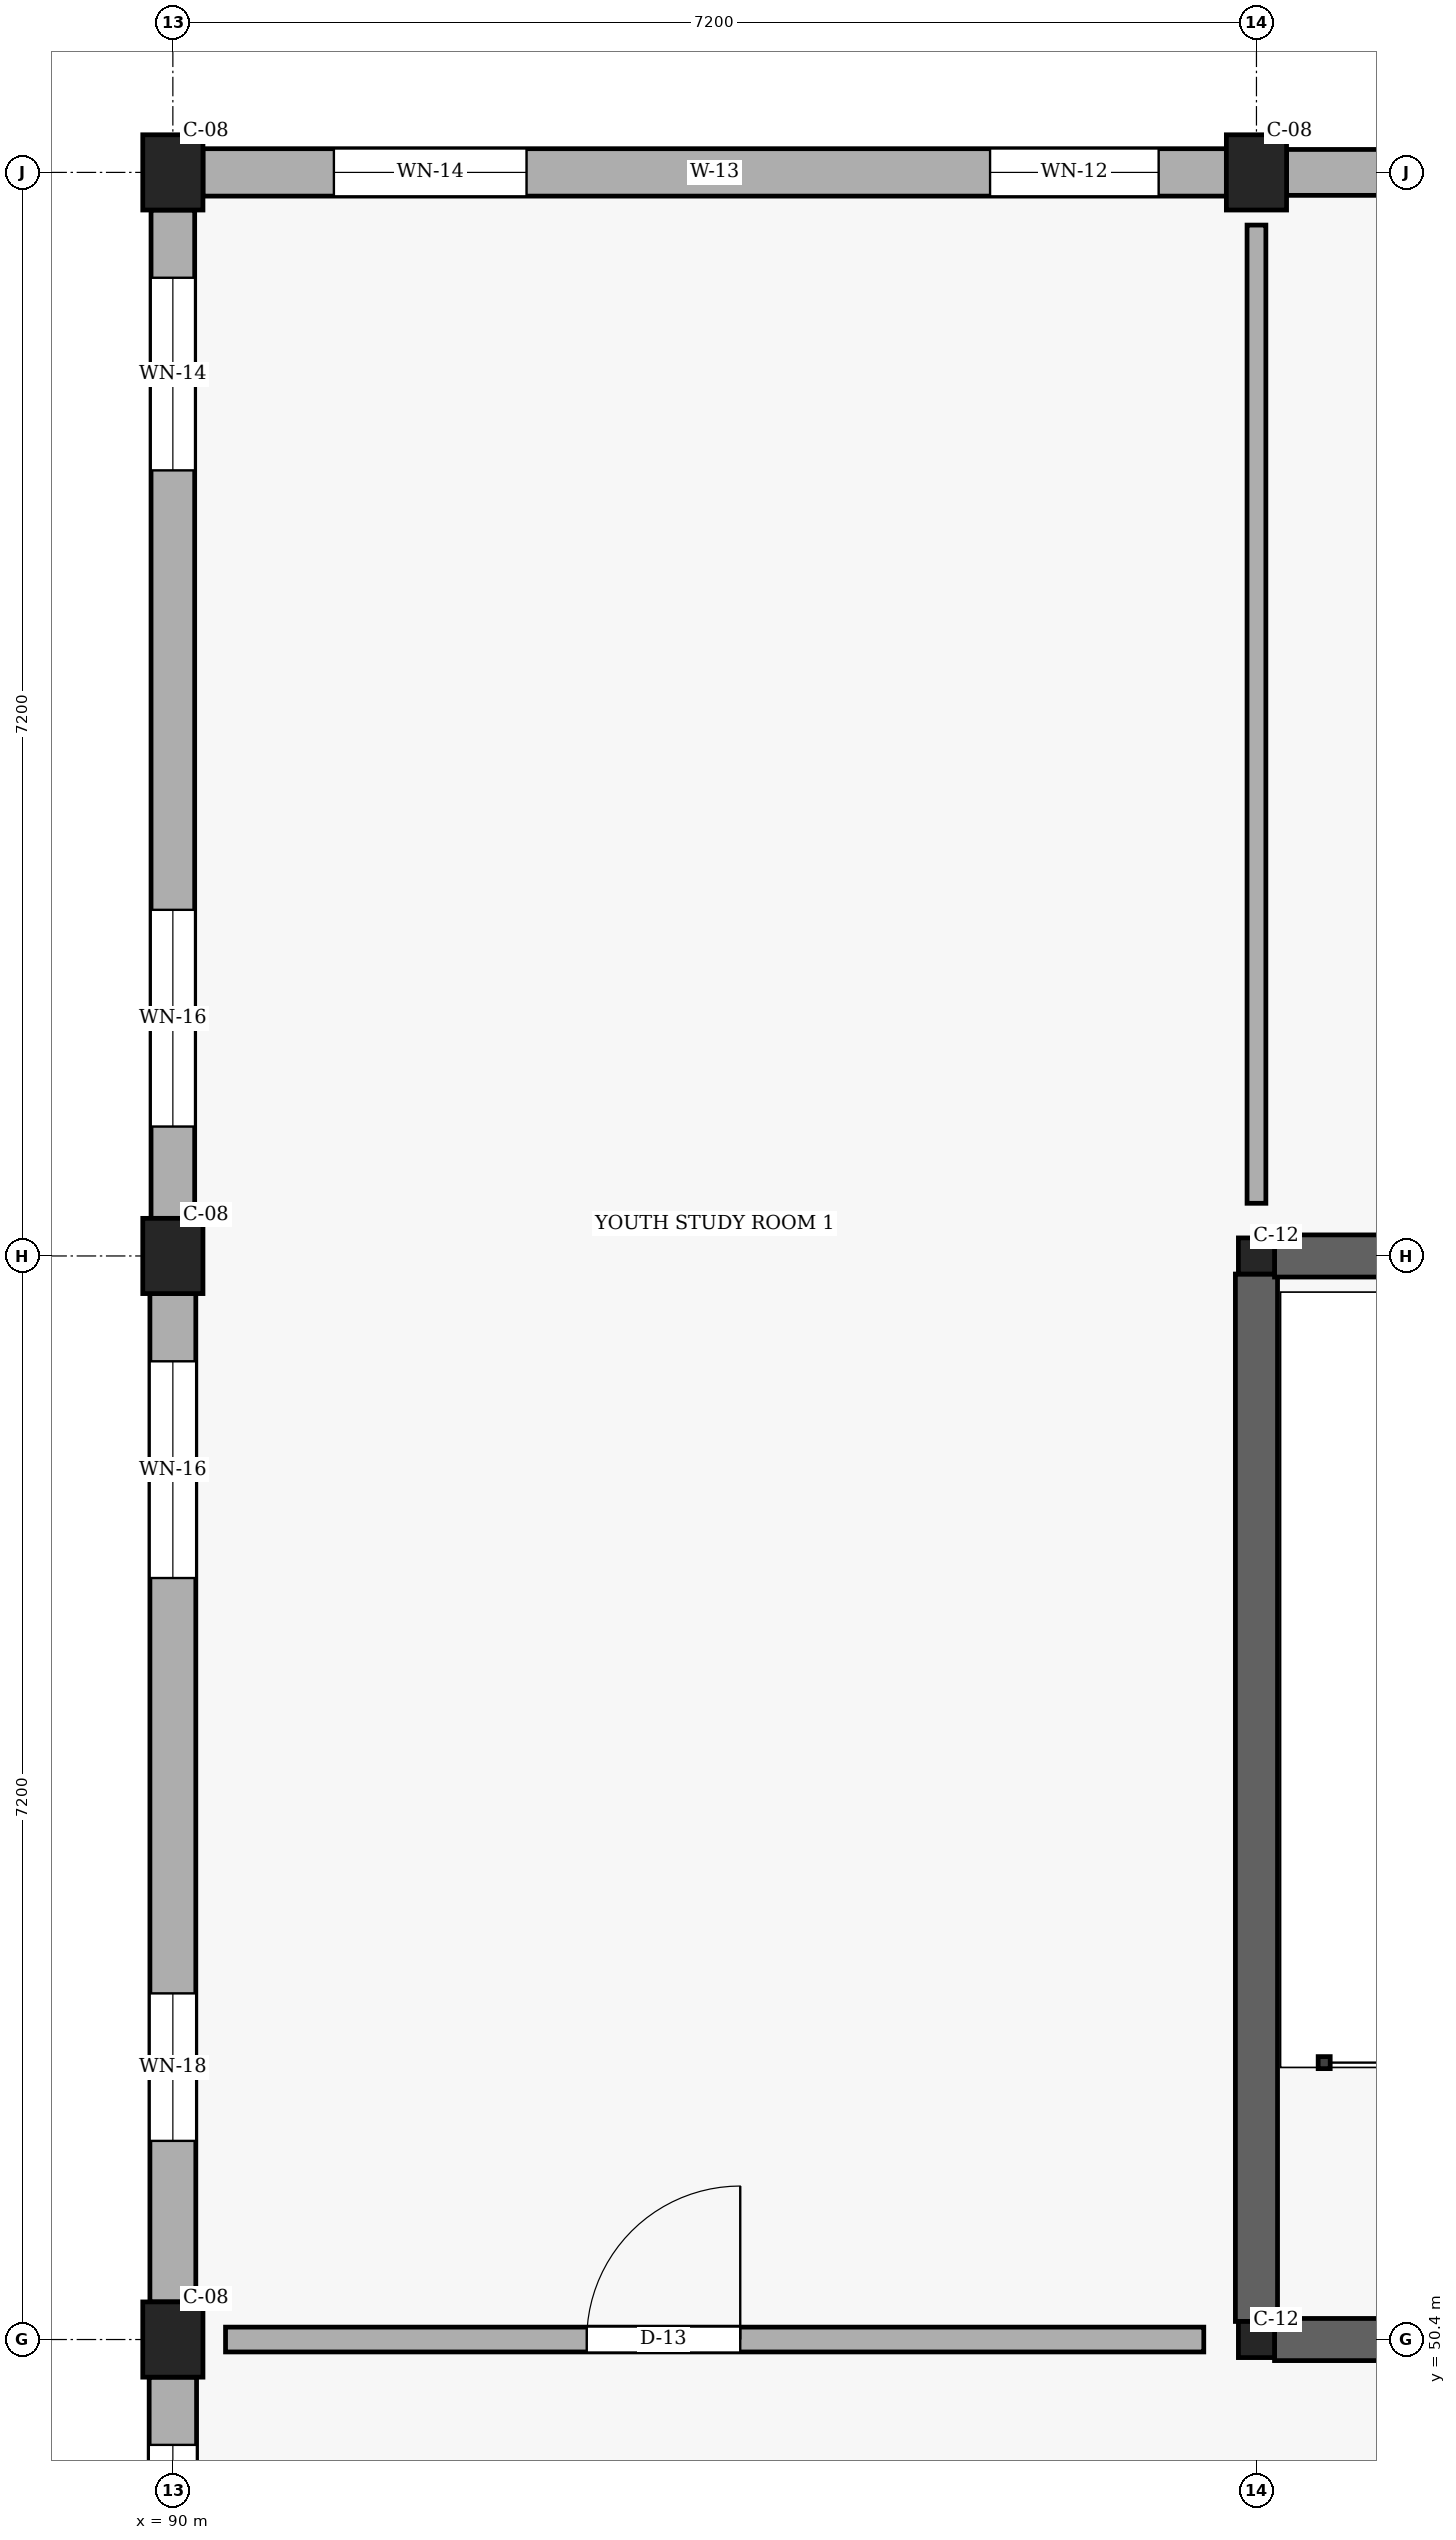
"""IFC4 building model, lengths in metres.
Left out: names, types, materials, properties, quantities, classifications, styles, units other than length and angle.
Written with IfcOpenShell. Run it as: python <this file> out.ifc"""

import sys

from ifc_helpers import new_model, si_unit, direction, frame, frame_2d, origin, origin_2d, place, context, subcontext, project, spatial, rectangle, i_section, extrude, element, fill, save


model = new_model("IFC4")
c1 = context("Model", 3, precision=1e-05, world=origin(), true_north=direction((0.0, 1.0)))
c2 = subcontext(c1, "Body", "Model", "MODEL_VIEW")
j1 = project(units=[si_unit("LENGTHUNIT", "METRE"), si_unit("PLANEANGLEUNIT", "RADIAN")], contexts=[c1])
p1 = place(None, origin())
s1 = spatial("IfcSite", under=j1, at=p1, CompositionType="ELEMENT")
p2 = place(p1, origin())
s2 = spatial("IfcBuilding", under=s1, at=p2, CompositionType="ELEMENT")
p3 = place(p2, frame((0.0, 0.0, 4.5)))
s3 = spatial("IfcBuildingStorey", under=s2, at=p3, CompositionType="ELEMENT", Elevation=4.5)
for number, where, z_axis, x_axis in (
    (1, (90.0, 50.4, 0.0), (0.0, 0.0, 1.0), (1.0, 0.0, 0.0)),
    (2, (90.0, 57.6, 0.0), (0.0, 0.0, 1.0), (1.0, 0.0, 0.0)),
    (3, (90.0, 64.8, 0.0), (0.0, 0.0, 1.0), (1.0, 0.0, 0.0)),
):
    element("IfcColumn", number, at=place(p3, frame(where, z_axis=z_axis, x_axis=x_axis)), inside=s3, PredefinedType="COLUMN", context=c2, shape_type="SweptSolid", body=[
        extrude(rectangle(XDim=0.4, YDim=0.5, at=origin_2d()), origin(), (0.0, 0.0, 1.0), 3.15),
    ])
for number, where, z_axis, x_axis in (
    (4, (97.2, 50.4, 0.0), (0.0, 0.0, 1.0), (1.0, 0.0, 0.0)),
    (5, (97.2, 57.6, 0.0), (0.0, 0.0, 1.0), (1.0, 0.0, 0.0)),
):
    element("IfcColumn", number, at=place(p3, frame(where, z_axis=z_axis, x_axis=x_axis)), inside=s3, PredefinedType="COLUMN", context=c2, shape_type="SweptSolid", body=[
        extrude(i_section(OverallWidth=0.24, OverallDepth=0.24, WebThickness=0.01, FlangeThickness=0.017, FilletRadius=0.021, at=origin_2d()), origin(), (0.0, 0.0, 1.0), 3.15),
    ])
p4 = place(p3, frame((97.2, 64.8, 0.0), z_axis=(0.0, 0.0, 1.0), x_axis=(1.0, 0.0, 0.0)))
e6 = element("IfcColumn", 6, at=p4, inside=s3, PredefinedType="COLUMN", context=c2, shape_type="SweptSolid", body=[
    extrude(rectangle(XDim=0.4, YDim=0.5, at=origin_2d()), origin(), (0.0, 0.0, 1.0), 3.15),
])
p5 = place(p3, frame((104.2, 64.8, 0.0), z_axis=(0.0, 0.0, 1.0), x_axis=(-1.0, 0.0, 0.0)))
e7 = element("IfcWall", 7, at=p5, inside=s3, PredefinedType="SOLIDWALL", context=c2, shape_type="SweptSolid", body=[
    extrude(rectangle(XDim=6.8, YDim=0.305, at=frame_2d((3.4, 0.0))), origin(), (0.0, 0.0, 1.0), 2.34),
])
p6 = place(p5, frame((0.45, 0.0, 0.78)))
e8 = element("IfcOpeningElement", 8, at=p6, cuts=e7, PredefinedType="OPENING", context=c2, shape_type="SweptSolid", body=[
    extrude(rectangle(XDim=0.96, YDim=1.26, at=frame_2d((0.48, 0.63))), frame((0.0, 0.163, 0.0), z_axis=(0.0, -1.0, 0.0), x_axis=(1.0, 0.0, 0.0)), (0.0, 0.0, 1.0), 0.325),
])
p7 = place(p5, frame((4.65, 0.0, 0.78)))
e9 = element("IfcOpeningElement", 9, at=p7, cuts=e7, PredefinedType="OPENING", context=c2, shape_type="SweptSolid", body=[
    extrude(rectangle(XDim=1.12, YDim=1.26, at=frame_2d((0.56, 0.63))), frame((0.0, 0.163, 0.0), z_axis=(0.0, -1.0, 0.0), x_axis=(1.0, 0.0, 0.0)), (0.0, 0.0, 1.0), 0.325),
])
p8 = place(p3, frame((97.0, 64.8, 0.0), z_axis=(0.0, 0.0, 1.0), x_axis=(-1.0, 0.0, 0.0)))
e10 = element("IfcWall", 10, at=p8, inside=s3, PredefinedType="SOLIDWALL", context=c2, shape_type="SweptSolid", body=[
    extrude(rectangle(XDim=6.8, YDim=0.315, at=frame_2d((3.4, 0.0))), origin(), (0.0, 0.0, 1.0), 2.34),
])
p9 = place(p8, frame((0.45, 0.0, 0.78)))
e11 = element("IfcOpeningElement", 11, at=p9, cuts=e10, PredefinedType="OPENING", context=c2, shape_type="SweptSolid", body=[
    extrude(rectangle(XDim=1.12, YDim=1.26, at=frame_2d((0.56, 0.63))), frame((0.0, 0.167, 0.0), z_axis=(0.0, -1.0, 0.0), x_axis=(1.0, 0.0, 0.0)), (0.0, 0.0, 1.0), 0.335),
])
p10 = place(p8, frame((4.65, 0.0, 0.78)))
e12 = element("IfcOpeningElement", 12, at=p10, cuts=e10, PredefinedType="OPENING", context=c2, shape_type="SweptSolid", body=[
    extrude(rectangle(XDim=1.28, YDim=1.26, at=frame_2d((0.64, 0.63))), frame((0.0, 0.167, 0.0), z_axis=(0.0, -1.0, 0.0), x_axis=(1.0, 0.0, 0.0)), (0.0, 0.0, 1.0), 0.335),
])
p11 = place(p3, frame((90.0, 64.55, 0.0), z_axis=(0.0, 0.0, 1.0), x_axis=(0.0, -1.0, 0.0)))
e13 = element("IfcWall", 13, at=p11, inside=s3, PredefinedType="SOLIDWALL", context=c2, shape_type="SweptSolid", body=[
    extrude(rectangle(XDim=6.7, YDim=0.29, at=frame_2d((3.35, 0.0))), origin(), (0.0, 0.0, 1.0), 2.34),
])
p12 = place(p11, frame((0.45, 0.0, 0.78)))
e14 = element("IfcOpeningElement", 14, at=p12, cuts=e13, PredefinedType="OPENING", context=c2, shape_type="SweptSolid", body=[
    extrude(rectangle(XDim=1.28, YDim=1.26, at=frame_2d((0.64, 0.63))), frame((0.0, 0.155, 0.0), z_axis=(0.0, -1.0, 0.0), x_axis=(1.0, 0.0, 0.0)), (0.0, 0.0, 1.0), 0.31),
])
p13 = place(p11, frame((4.65, 0.0, 0.78)))
e15 = element("IfcOpeningElement", 15, at=p13, cuts=e13, PredefinedType="OPENING", context=c2, shape_type="SweptSolid", body=[
    extrude(rectangle(XDim=1.44, YDim=1.26, at=frame_2d((0.72, 0.63))), frame((0.0, 0.155, 0.0), z_axis=(0.0, -1.0, 0.0), x_axis=(1.0, 0.0, 0.0)), (0.0, 0.0, 1.0), 0.31),
])
p14 = place(p3, frame((90.0, 57.35, 0.0), z_axis=(0.0, 0.0, 1.0), x_axis=(0.0, -1.0, 0.0)))
e16 = element("IfcWall", 16, at=p14, inside=s3, PredefinedType="SOLIDWALL", context=c2, shape_type="SweptSolid", body=[
    extrude(rectangle(XDim=6.7, YDim=0.305, at=frame_2d((3.35, 0.0))), origin(), (0.0, 0.0, 1.0), 2.34),
])
p15 = place(p14, frame((0.45, 0.0, 0.78)))
e17 = element("IfcOpeningElement", 17, at=p15, cuts=e16, PredefinedType="OPENING", context=c2, shape_type="SweptSolid", body=[
    extrude(rectangle(XDim=1.44, YDim=1.26, at=frame_2d((0.72, 0.63))), frame((0.0, 0.163, 0.0), z_axis=(0.0, -1.0, 0.0), x_axis=(1.0, 0.0, 0.0)), (0.0, 0.0, 1.0), 0.325),
])
p16 = place(p14, frame((4.65, 0.0, 0.78)))
e18 = element("IfcOpeningElement", 18, at=p16, cuts=e16, PredefinedType="OPENING", context=c2, shape_type="SweptSolid", body=[
    extrude(rectangle(XDim=0.98, YDim=1.36, at=frame_2d((0.49, 0.68))), frame((0.0, 0.163, 0.0), z_axis=(0.0, -1.0, 0.0), x_axis=(1.0, 0.0, 0.0)), (0.0, 0.0, 1.0), 0.325),
])
p17 = place(p3, frame((90.0, 50.15, 0.0), z_axis=(0.0, 0.0, 1.0), x_axis=(0.0, -1.0, 0.0)))
e19 = element("IfcWall", 19, at=p17, inside=s3, PredefinedType="SOLIDWALL", context=c2, shape_type="SweptSolid", body=[
    extrude(rectangle(XDim=6.7, YDim=0.315, at=frame_2d((3.35, 0.0))), origin(), (0.0, 0.0, 1.0), 2.34),
])
p18 = place(p17, frame((0.45, 0.0, 0.78)))
e20 = element("IfcOpeningElement", 20, at=p18, cuts=e19, PredefinedType="OPENING", context=c2, shape_type="SweptSolid", body=[
    extrude(rectangle(XDim=0.98, YDim=1.36, at=frame_2d((0.49, 0.68))), frame((0.0, 0.167, 0.0), z_axis=(0.0, -1.0, 0.0), x_axis=(1.0, 0.0, 0.0)), (0.0, 0.0, 1.0), 0.335),
])
p19 = place(p17, frame((4.65, 0.0, 0.78)))
e21 = element("IfcOpeningElement", 21, at=p19, cuts=e19, PredefinedType="OPENING", context=c2, shape_type="SweptSolid", body=[
    extrude(rectangle(XDim=1.14, YDim=1.36, at=frame_2d((0.57, 0.68))), frame((0.0, 0.167, 0.0), z_axis=(0.0, -1.0, 0.0), x_axis=(1.0, 0.0, 0.0)), (0.0, 0.0, 1.0), 0.335),
])
for number, where, z_axis, x_axis in (
    (22, (97.2, 50.52, 0.0), (0.0, 0.0, 1.0), (0.0, 1.0, 0.0)),
    (23, (97.32, 57.6, 0.0), (0.0, 0.0, 1.0), (1.0, 0.0, 0.0)),
):
    element("IfcWall", number, at=place(p3, frame(where, z_axis=z_axis, x_axis=x_axis)), inside=s3, PredefinedType="SHEAR", context=c2, shape_type="SweptSolid", body=[
        extrude(rectangle(XDim=6.96, YDim=0.28, at=frame_2d((3.48, 0.0))), origin(), (0.0, 0.0, 1.0), 2.89),
    ])
p20 = place(p3, frame((97.32, 50.4, 0.0), z_axis=(0.0, 0.0, 1.0), x_axis=(1.0, 0.0, 0.0)))
e24 = element("IfcWall", 24, at=p20, inside=s3, PredefinedType="SHEAR", context=c2, shape_type="SweptSolid", body=[
    extrude(rectangle(XDim=6.96, YDim=0.28, at=frame_2d((3.48, 0.0))), origin(), (0.0, 0.0, 1.0), 2.89),
])
p21 = place(p20, frame((4.63, 0.0, 0.0)))
e25 = element("IfcOpeningElement", 25, at=p21, cuts=e24, PredefinedType="OPENING", context=c2, shape_type="SweptSolid", body=[
    extrude(rectangle(XDim=1.1, YDim=2.15, at=frame_2d((0.55, 1.075))), frame((0.0, 0.15, 0.0), z_axis=(0.0, -1.0, 0.0), x_axis=(1.0, 0.0, 0.0)), (0.0, 0.0, 1.0), 0.3),
])
p22 = place(p3, frame((90.35, 50.4, 0.0), z_axis=(0.0, 0.0, 1.0), x_axis=(1.0, 0.0, 0.0)))
e26 = element("IfcWall", 26, at=p22, inside=s3, PredefinedType="PARTITIONING", context=c2, shape_type="SweptSolid", body=[
    extrude(rectangle(XDim=6.5, YDim=0.165, at=frame_2d((3.25, 0.0))), origin(), (0.0, 0.0, 1.0), 2.29),
])
p23 = place(p22, frame((2.4, 0.0, 0.0)))
e27 = element("IfcOpeningElement", 27, at=p23, cuts=e26, PredefinedType="OPENING", context=c2, shape_type="SweptSolid", body=[
    extrude(rectangle(XDim=1.02, YDim=2.15, at=frame_2d((0.51, 1.075))), frame((0.0, 0.093, 0.0), z_axis=(0.0, -1.0, 0.0), x_axis=(1.0, 0.0, 0.0)), (0.0, 0.0, 1.0), 0.185),
])
p24 = place(p3, frame((97.2, 57.95, 0.0), z_axis=(0.0, 0.0, 1.0), x_axis=(0.0, 1.0, 0.0)))
e28 = element("IfcWall", 28, at=p24, inside=s3, PredefinedType="PARTITIONING", context=c2, shape_type="SweptSolid", body=[
    extrude(rectangle(XDim=6.5, YDim=0.125, at=frame_2d((3.25, 0.0))), origin(), (0.0, 0.0, 1.0), 2.29),
])
p25 = place(p9, origin())
e29 = element("IfcWindow", 29, at=p25, inside=s3, PartitioningType="SINGLE_PANEL", PredefinedType="WINDOW", context=c2, shape_type="SweptSolid", body=[
    extrude(rectangle(XDim=1.12, YDim=1.26, at=frame_2d((0.56, 0.63))), frame((0.0, 0.03, 0.0), z_axis=(0.0, -1.0, 0.0), x_axis=(1.0, 0.0, 0.0)), (0.0, 0.0, 1.0), 0.06),
])
fill(e11, e29)
p26 = place(p10, origin())
e30 = element("IfcWindow", 30, at=p26, inside=s3, PartitioningType="SINGLE_PANEL", PredefinedType="WINDOW", context=c2, shape_type="SweptSolid", body=[
    extrude(rectangle(XDim=1.28, YDim=1.26, at=frame_2d((0.64, 0.63))), frame((0.0, 0.03, 0.0), z_axis=(0.0, -1.0, 0.0), x_axis=(1.0, 0.0, 0.0)), (0.0, 0.0, 1.0), 0.06),
])
fill(e12, e30)
p27 = place(p12, origin())
e31 = element("IfcWindow", 31, at=p27, inside=s3, PartitioningType="SINGLE_PANEL", PredefinedType="WINDOW", context=c2, shape_type="SweptSolid", body=[
    extrude(rectangle(XDim=1.28, YDim=1.26, at=frame_2d((0.64, 0.63))), frame((0.0, 0.03, 0.0), z_axis=(0.0, -1.0, 0.0), x_axis=(1.0, 0.0, 0.0)), (0.0, 0.0, 1.0), 0.06),
])
fill(e14, e31)
p28 = place(p13, origin())
e32 = element("IfcWindow", 32, at=p28, inside=s3, PartitioningType="SINGLE_PANEL", PredefinedType="WINDOW", context=c2, shape_type="SweptSolid", body=[
    extrude(rectangle(XDim=1.44, YDim=1.26, at=frame_2d((0.72, 0.63))), frame((0.0, 0.03, 0.0), z_axis=(0.0, -1.0, 0.0), x_axis=(1.0, 0.0, 0.0)), (0.0, 0.0, 1.0), 0.06),
])
fill(e15, e32)
p29 = place(p15, origin())
e33 = element("IfcWindow", 33, at=p29, inside=s3, PartitioningType="SINGLE_PANEL", PredefinedType="WINDOW", context=c2, shape_type="SweptSolid", body=[
    extrude(rectangle(XDim=1.44, YDim=1.26, at=frame_2d((0.72, 0.63))), frame((0.0, 0.03, 0.0), z_axis=(0.0, -1.0, 0.0), x_axis=(1.0, 0.0, 0.0)), (0.0, 0.0, 1.0), 0.06),
])
fill(e17, e33)
p30 = place(p16, origin())
e34 = element("IfcWindow", 34, at=p30, inside=s3, PartitioningType="SINGLE_PANEL", PredefinedType="WINDOW", context=c2, shape_type="SweptSolid", body=[
    extrude(rectangle(XDim=0.98, YDim=1.36, at=frame_2d((0.49, 0.68))), frame((0.0, 0.03, 0.0), z_axis=(0.0, -1.0, 0.0), x_axis=(1.0, 0.0, 0.0)), (0.0, 0.0, 1.0), 0.06),
])
fill(e18, e34)
p31 = place(p18, origin())
e35 = element("IfcWindow", 35, at=p31, inside=s3, PartitioningType="SINGLE_PANEL", PredefinedType="WINDOW", context=c2, shape_type="SweptSolid", body=[
    extrude(rectangle(XDim=0.98, YDim=1.36, at=frame_2d((0.49, 0.68))), frame((0.0, 0.03, 0.0), z_axis=(0.0, -1.0, 0.0), x_axis=(1.0, 0.0, 0.0)), (0.0, 0.0, 1.0), 0.06),
])
fill(e20, e35)
p32 = place(p23, origin())
e36 = element("IfcDoor", 36, at=p32, inside=s3, OperationType="SINGLE_SWING_RIGHT", PredefinedType="DOOR", context=c2, shape_type="SweptSolid", body=[
    extrude(rectangle(XDim=1.02, YDim=2.15, at=frame_2d((0.51, 1.075))), frame((0.0, 0.025, 0.0), z_axis=(0.0, -1.0, 0.0), x_axis=(1.0, 0.0, 0.0)), (0.0, 0.0, 1.0), 0.05),
])
fill(e27, e36)
save(model, sys.argv[1])
